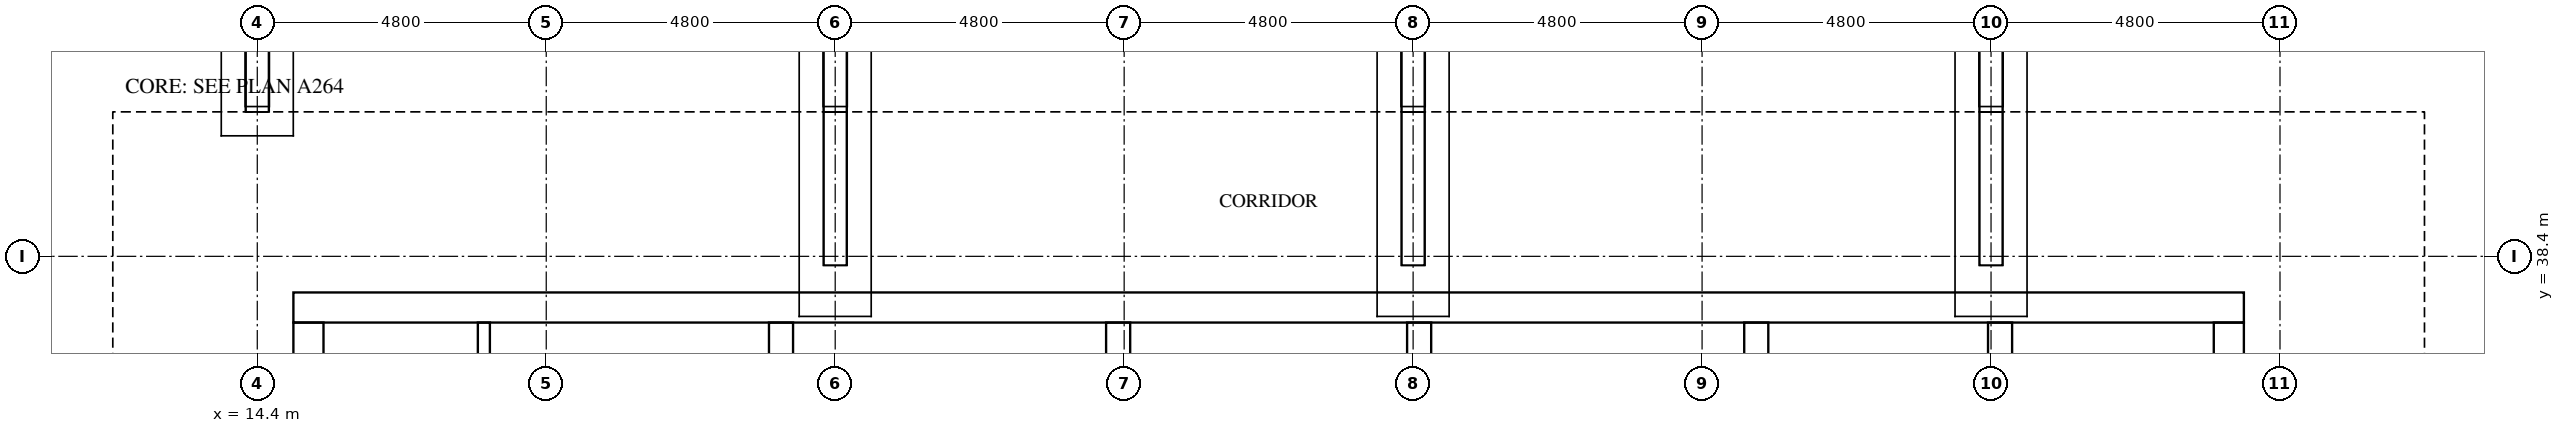
"""IFC4 building model, lengths in metres.
Left out: names, types, materials, properties, quantities, classifications, styles, units other than length and angle.
Written with IfcOpenShell. Run it as: python <this file> out.ifc"""

import sys

from ifc_helpers import new_model, si_unit, direction, frame, frame_2d, origin, place, context, subcontext, project, spatial, rectangle, extrude, element, fill, save


model = new_model("IFC4")
c1 = context("Model", 3, precision=1e-05, world=origin(), true_north=direction((0.0, 1.0)))
c2 = subcontext(c1, "Body", "Model", "MODEL_VIEW")
j1 = project(units=[si_unit("LENGTHUNIT", "METRE"), si_unit("PLANEANGLEUNIT", "RADIAN")], contexts=[c1])
p1 = place(None, origin())
s1 = spatial("IfcSite", under=j1, at=p1, CompositionType="ELEMENT")
p2 = place(p1, origin())
s2 = spatial("IfcBuilding", under=s1, at=p2, CompositionType="ELEMENT")
p3 = place(p2, frame((0.0, 0.0, 263.2)))
s3 = spatial("IfcBuildingStorey", under=s2, at=p3, CompositionType="ELEMENT", Elevation=263.2)
p4 = place(p3, frame((15.0, 37.55, 0.0), z_axis=(0.0, 0.0, 1.0), x_axis=(1.0, 0.0, 0.0)))
e1 = element("IfcWall", 1, at=p4, inside=s3, PredefinedType="SHEAR", context=c2, shape_type="SweptSolid", body=[
    extrude(rectangle(XDim=32.4, YDim=0.5, at=frame_2d((16.2, 0.0))), origin(), (0.0, 0.0, 1.0), 5.1),
])
p5 = place(p4, frame((15.3, 0.0, 0.0)))
e2 = element("IfcOpeningElement", 2, at=p5, cuts=e1, PredefinedType="OPENING", context=c2, shape_type="SweptSolid", body=[
    extrude(rectangle(XDim=1.8, YDim=2.1, at=frame_2d((0.9, 1.05))), frame((0.0, 0.26, 0.0), z_axis=(0.0, -1.0, 0.0), x_axis=(1.0, 0.0, 0.0)), (0.0, 0.0, 1.0), 0.52),
])
p6 = place(p4, frame((1.282, 0.0, 0.0)))
e3 = element("IfcOpeningElement", 3, at=p6, cuts=e1, PredefinedType="OPENING", context=c2, shape_type="SweptSolid", body=[
    extrude(rectangle(XDim=1.0, YDim=2.1, at=frame_2d((0.5, 1.05))), frame((0.0, 0.26, 0.0), z_axis=(0.0, -1.0, 0.0), x_axis=(1.0, 0.0, 0.0)), (0.0, 0.0, 1.0), 0.52),
])
p7 = place(p4, frame((5.082, 0.0, 0.0)))
e4 = element("IfcOpeningElement", 4, at=p7, cuts=e1, PredefinedType="OPENING", context=c2, shape_type="SweptSolid", body=[
    extrude(rectangle(XDim=1.0, YDim=2.1, at=frame_2d((0.5, 1.05))), frame((0.0, 0.26, 0.0), z_axis=(0.0, -1.0, 0.0), x_axis=(1.0, 0.0, 0.0)), (0.0, 0.0, 1.0), 0.52),
])
p8 = place(p3, frame((15.25, 15.5, 0.0), z_axis=(0.0, 0.0, 1.0), x_axis=(0.0, 1.0, 0.0)))
e5 = element("IfcWall", 5, at=p8, inside=s3, PredefinedType="SHEAR", context=c2, shape_type="SweptSolid", body=[
    extrude(rectangle(XDim=21.8, YDim=0.5, at=frame_2d((10.9, 0.0))), origin(), (0.0, 0.0, 1.0), 5.1),
])
p9 = place(p8, frame((5.26, 0.0, 0.0)))
e6 = element("IfcOpeningElement", 6, at=p9, cuts=e5, PredefinedType="OPENING", context=c2, shape_type="SweptSolid", body=[
    extrude(rectangle(XDim=1.2, YDim=2.1, at=frame_2d((0.6, 1.05))), frame((0.0, 0.26, 0.0), z_axis=(0.0, -1.0, 0.0), x_axis=(1.0, 0.0, 0.0)), (0.0, 0.0, 1.0), 0.52),
])
p10 = place(p3, frame((47.15, 15.5, 0.0), z_axis=(0.0, 0.0, 1.0), x_axis=(0.0, 1.0, 0.0)))
e7 = element("IfcWall", 7, at=p10, inside=s3, PredefinedType="SHEAR", context=c2, shape_type="SweptSolid", body=[
    extrude(rectangle(XDim=21.8, YDim=0.5, at=frame_2d((10.9, 0.0))), origin(), (0.0, 0.0, 1.0), 5.1),
])
p11 = place(p10, frame((10.6, 0.0, 0.0)))
e8 = element("IfcOpeningElement", 8, at=p11, cuts=e7, PredefinedType="OPENING", context=c2, shape_type="SweptSolid", body=[
    extrude(rectangle(XDim=1.2, YDim=2.1, at=frame_2d((0.6, 1.05))), frame((0.0, 0.26, 0.0), z_axis=(0.0, -1.0, 0.0), x_axis=(1.0, 0.0, 0.0)), (0.0, 0.0, 1.0), 0.52),
])
p12 = place(p3, frame((23.1, 15.5, 0.0), z_axis=(0.0, 0.0, 1.0), x_axis=(0.0, 1.0, 0.0)))
e9 = element("IfcWall", 9, at=p12, inside=s3, PredefinedType="SHEAR", context=c2, shape_type="SweptSolid", body=[
    extrude(rectangle(XDim=21.8, YDim=0.4, at=frame_2d((10.9, 0.0))), origin(), (0.0, 0.0, 1.0), 5.1),
])
p13 = place(p3, frame((39.3, 27.75, 0.0), z_axis=(0.0, 0.0, 1.0), x_axis=(0.0, 1.0, 0.0)))
e10 = element("IfcWall", 10, at=p13, inside=s3, PredefinedType="SHEAR", context=c2, shape_type="SweptSolid", body=[
    extrude(rectangle(XDim=9.55, YDim=0.4, at=frame_2d((4.775, 0.0))), origin(), (0.0, 0.0, 1.0), 5.1),
])
p14 = place(p3, frame((43.35, 27.75, 0.0), z_axis=(0.0, 0.0, 1.0), x_axis=(0.0, 1.0, 0.0)))
e11 = element("IfcWall", 11, at=p14, inside=s3, PredefinedType="SHEAR", context=c2, shape_type="SweptSolid", body=[
    extrude(rectangle(XDim=9.55, YDim=0.4, at=frame_2d((4.775, 0.0))), origin(), (0.0, 0.0, 1.0), 5.1),
])
p15 = place(p14, frame((7.65, 0.0, 0.0)))
e12 = element("IfcOpeningElement", 12, at=p15, cuts=e11, PredefinedType="OPENING", context=c2, shape_type="SweptSolid", body=[
    extrude(rectangle(XDim=1.2, YDim=2.1, at=frame_2d((0.6, 1.05))), frame((0.0, 0.21, 0.0), z_axis=(0.0, -1.0, 0.0), x_axis=(1.0, 0.0, 0.0)), (0.0, 0.0, 1.0), 0.42),
])
for number, where, z_axis, x_axis in (
    (13, (28.7, 33.75, 0.0), (0.0, 0.0, 1.0), (0.0, 1.0, 0.0)),
    (14, (33.7, 33.75, 0.0), (0.0, 0.0, 1.0), (0.0, 1.0, 0.0)),
):
    element("IfcWall", number, at=place(p3, frame(where, z_axis=z_axis, x_axis=x_axis)), inside=s3, PredefinedType="SHEAR", context=c2, shape_type="SweptSolid", body=[
        extrude(rectangle(XDim=3.55, YDim=0.4, at=frame_2d((1.775, 0.0))), origin(), (0.0, 0.0, 1.0), 5.1),
    ])
p16 = place(p3, frame((18.164, 31.45, 0.0), z_axis=(0.0, 0.0, 1.0), x_axis=(0.0, 1.0, 0.0)))
e15 = element("IfcWall", 15, at=p16, inside=s3, PredefinedType="PARTITIONING", context=c2, shape_type="SweptSolid", body=[
    extrude(rectangle(XDim=5.85, YDim=0.2, at=frame_2d((2.925, 0.0))), origin(), (0.0, 0.0, 1.0), 5.1),
])
p17 = place(p5, origin())
e16 = element("IfcDoor", 16, at=p17, inside=s3, OperationType="DOUBLE_DOOR_SINGLE_SWING", PredefinedType="DOOR", context=c2, shape_type="SweptSolid", body=[
    extrude(rectangle(XDim=1.8, YDim=2.1, at=frame_2d((0.9, 1.05))), frame((0.0, 0.025, 0.0), z_axis=(0.0, -1.0, 0.0), x_axis=(1.0, 0.0, 0.0)), (0.0, 0.0, 1.0), 0.05),
])
fill(e2, e16)
p18 = place(p6, origin())
e17 = element("IfcDoor", 17, at=p18, inside=s3, OperationType="SINGLE_SWING_RIGHT", PredefinedType="DOOR", context=c2, shape_type="SweptSolid", body=[
    extrude(rectangle(XDim=1.0, YDim=2.1, at=frame_2d((0.5, 1.05))), frame((0.0, 0.025, 0.0), z_axis=(0.0, -1.0, 0.0), x_axis=(1.0, 0.0, 0.0)), (0.0, 0.0, 1.0), 0.05),
])
fill(e3, e17)
p19 = place(p7, origin())
e18 = element("IfcDoor", 18, at=p19, inside=s3, OperationType="SINGLE_SWING_LEFT", PredefinedType="DOOR", context=c2, shape_type="SweptSolid", body=[
    extrude(rectangle(XDim=1.0, YDim=2.1, at=frame_2d((0.5, 1.05))), frame((0.0, 0.025, 0.0), z_axis=(0.0, -1.0, 0.0), x_axis=(1.0, 0.0, 0.0)), (0.0, 0.0, 1.0), 0.05),
])
fill(e4, e18)
save(model, sys.argv[1])
